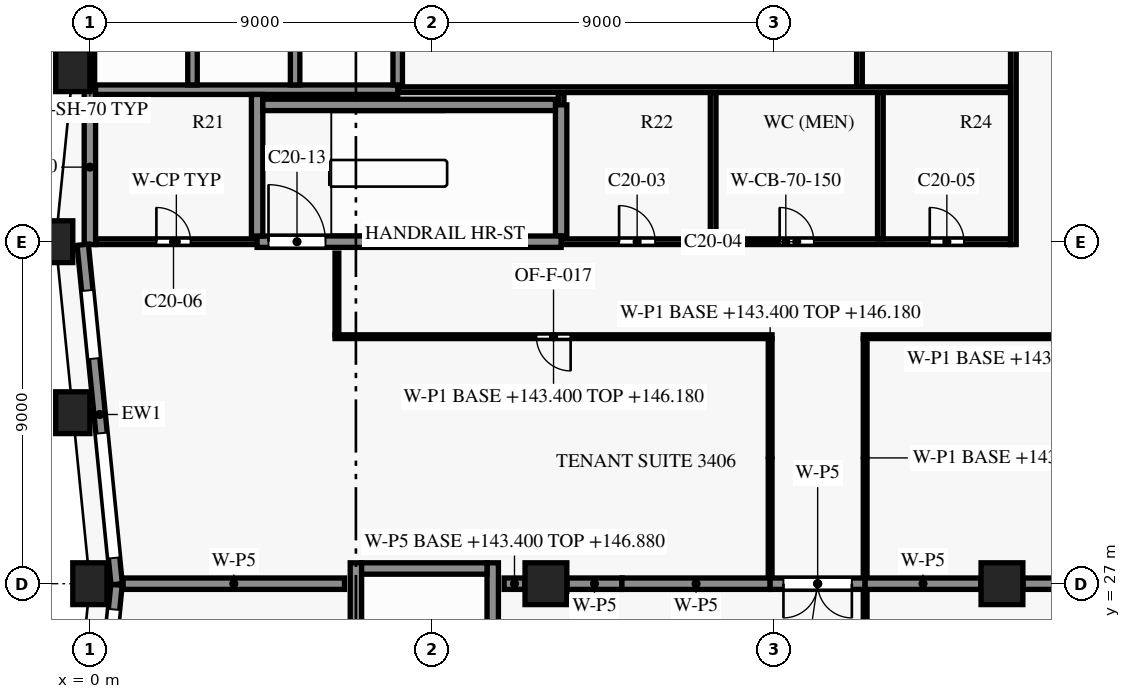
"""IFC4 building model, lengths in metres.
Left out: names, types, materials, properties, quantities, classifications, styles, units other than length and angle.
Written with IfcOpenShell. Run it as: python <this file> out.ifc"""

import sys

from ifc_helpers import new_model, si_unit, direction, frame, frame_2d, origin, origin_2d, place, context, subcontext, project, spatial, rectangle, extrude, element, fill, save


model = new_model("IFC4")
c1 = context("Model", 3, precision=1e-05, world=origin(), true_north=direction((0.0, 1.0)))
c2 = subcontext(c1, "Body", "Model", "MODEL_VIEW")
j1 = project(units=[si_unit("LENGTHUNIT", "METRE"), si_unit("PLANEANGLEUNIT", "RADIAN")], contexts=[c1])
p1 = place(None, origin())
s1 = spatial("IfcSite", under=j1, at=p1, CompositionType="ELEMENT")
p2 = place(p1, origin())
s2 = spatial("IfcBuilding", under=s1, at=p2, CompositionType="ELEMENT")
p3 = place(p2, frame((0.0, 0.0, 143.4)))
s3 = spatial("IfcBuildingStorey", under=s2, at=p3, CompositionType="ELEMENT", Elevation=143.4)
for number, where, z_axis, x_axis in (
    (1, (-0.45, 40.5, 0.0), (0.0, 0.0, 1.0), (-0.1, -0.995, 0.0)),
    (2, (-0.9, 36.0, 0.0), (0.0, 0.0, 1.0), (0.0, -1.0, 0.0)),
    (3, (-0.45, 31.5, 0.0), (0.0, 0.0, 1.0), (0.1, -0.995, 0.0)),
    (4, (0.0, 27.0, 0.0), (0.0, 0.0, 1.0), (0.0, -1.0, 0.0)),
):
    element("IfcColumn", number, at=place(p3, frame(where, z_axis=z_axis, x_axis=x_axis)), inside=s3, PredefinedType="COLUMN", context=c2, shape_type="SweptSolid", body=[
        extrude(rectangle(XDim=0.9, YDim=1.1, at=origin_2d()), origin(), (0.0, 0.0, 1.0), 3.8),
    ])
for number, where, z_axis, x_axis in (
    (5, (12.0, 27.0, 0.0), (0.0, 0.0, 1.0), (1.0, 0.0, 0.0)),
    (6, (24.0, 27.0, 0.0), (0.0, 0.0, 1.0), (1.0, 0.0, 0.0)),
):
    element("IfcColumn", number, at=place(p3, frame(where, z_axis=z_axis, x_axis=x_axis)), inside=s3, PredefinedType="COLUMN", context=c2, shape_type="SweptSolid", body=[
        extrude(rectangle(XDim=1.1, YDim=1.1, at=origin_2d()), origin(), (0.0, 0.0, 1.0), 3.8),
    ])
p4 = place(p3, frame((0.705, 26.985, 0.0), z_axis=(0.0, 0.0, 1.0), x_axis=(-0.099533329093, 0.995034228758, 0.0)))
e7 = element("IfcWall", 7, at=p4, inside=s3, PredefinedType="SOLIDWALL", context=c2, shape_type="SweptSolid", body=[
    extrude(rectangle(XDim=8.98, YDim=0.3, at=frame_2d((4.49, 0.0))), origin(), (0.0, 0.0, 1.0), 3.15),
])
p5 = place(p4, frame((0.696, 0.0, 0.15)))
e8 = element("IfcOpeningElement", 8, at=p5, cuts=e7, PredefinedType="OPENING", context=c2, shape_type="SweptSolid", body=[
    extrude(rectangle(XDim=3.3, YDim=2.4, at=frame_2d((1.65, 1.2))), frame((0.0, 0.16, 0.0), z_axis=(0.0, -1.0, 0.0), x_axis=(1.0, 0.0, 0.0)), (0.0, 0.0, 1.0), 0.32),
])
p6 = place(p4, frame((5.969, 0.0, 0.75)))
e9 = element("IfcOpeningElement", 9, at=p6, cuts=e7, PredefinedType="OPENING", context=c2, shape_type="SweptSolid", body=[
    extrude(rectangle(XDim=1.8, YDim=1.8, at=frame_2d((0.9, 0.9))), frame((0.0, 0.16, 0.0), z_axis=(0.0, -1.0, 0.0), x_axis=(1.0, 0.0, 0.0)), (0.0, 0.0, 1.0), 0.32),
])
p7 = place(p3, frame((-0.198, 17.985, 0.0), z_axis=(0.0, 0.0, 1.0), x_axis=(0.099495688264, 0.995037993253, 0.0)))
e10 = element("IfcWall", 10, at=p7, inside=s3, PredefinedType="SOLIDWALL", context=c2, shape_type="SweptSolid", body=[
    extrude(rectangle(XDim=9.03, YDim=0.3, at=frame_2d((4.515, 0.0))), origin(), (0.0, 0.0, 1.0), 3.15),
])
p8 = place(p7, frame((1.306, 0.0, 0.75)))
e11 = element("IfcOpeningElement", 11, at=p8, cuts=e10, PredefinedType="OPENING", context=c2, shape_type="SweptSolid", body=[
    extrude(rectangle(XDim=1.8, YDim=1.8, at=frame_2d((0.9, 0.9))), frame((0.0, 0.16, 0.0), z_axis=(0.0, -1.0, 0.0), x_axis=(1.0, 0.0, 0.0)), (0.0, 0.0, 1.0), 0.32),
])
p9 = place(p7, frame((5.079, 0.0, 0.15)))
e12 = element("IfcOpeningElement", 12, at=p9, cuts=e10, PredefinedType="OPENING", context=c2, shape_type="SweptSolid", body=[
    extrude(rectangle(XDim=3.3, YDim=2.4, at=frame_2d((1.65, 1.2))), frame((0.0, 0.16, 0.0), z_axis=(0.0, -1.0, 0.0), x_axis=(1.0, 0.0, 0.0)), (0.0, 0.0, 1.0), 0.32),
])
p10 = place(p3, frame((7.15, 27.4, 0.0), z_axis=(0.0, 0.0, 1.0), x_axis=(1.0, 0.0, 0.0)))
e13 = element("IfcWall", 13, at=p10, inside=s3, PredefinedType="SHEAR", context=c2, shape_type="SweptSolid", body=[
    extrude(rectangle(XDim=3.3, YDim=0.3, at=frame_2d((1.65, 0.0))), origin(), (0.0, 0.0, 1.0), 3.5),
])
p11 = place(p3, frame((0.15, 36.0, 0.0), z_axis=(0.0, 0.0, 1.0), x_axis=(1.0, 0.0, 0.0)))
e14 = element("IfcWall", 14, at=p11, inside=s3, PredefinedType="PARTITIONING", context=c2, shape_type="SweptSolid", body=[
    extrude(rectangle(XDim=4.25, YDim=0.15, at=frame_2d((2.125, 0.0))), origin(), (0.0, 0.0, 1.0), 3.5),
])
p12 = place(p11, frame((1.6, 0.0, 0.0)))
e15 = element("IfcOpeningElement", 15, at=p12, cuts=e14, PredefinedType="OPENING", context=c2, shape_type="SweptSolid", body=[
    extrude(rectangle(XDim=0.9, YDim=2.1, at=frame_2d((0.45, 1.05))), frame((0.0, 0.085, 0.0), z_axis=(0.0, -1.0, 0.0), x_axis=(1.0, 0.0, 0.0)), (0.0, 0.0, 1.0), 0.17),
])
p13 = place(p3, frame((12.4, 36.0, 0.0), z_axis=(0.0, 0.0, 1.0), x_axis=(1.0, 0.0, 0.0)))
e16 = element("IfcWall", 16, at=p13, inside=s3, PredefinedType="SHEAR", context=c2, shape_type="SweptSolid", body=[
    extrude(rectangle(XDim=11.825, YDim=0.15, at=frame_2d((5.913, 0.0))), origin(), (0.0, 0.0, 1.0), 3.5),
])
p14 = place(p13, frame((1.525, 0.0, 0.0)))
e17 = element("IfcOpeningElement", 17, at=p14, cuts=e16, PredefinedType="OPENING", context=c2, shape_type="SweptSolid", body=[
    extrude(rectangle(XDim=0.95, YDim=2.1, at=frame_2d((0.475, 1.05))), frame((0.0, 0.085, 0.0), z_axis=(0.0, -1.0, 0.0), x_axis=(1.0, 0.0, 0.0)), (0.0, 0.0, 1.0), 0.17),
])
p15 = place(p13, frame((5.75, 0.0, 0.0)))
e18 = element("IfcOpeningElement", 18, at=p15, cuts=e16, PredefinedType="OPENING", context=c2, shape_type="SweptSolid", body=[
    extrude(rectangle(XDim=0.9, YDim=2.1, at=frame_2d((0.45, 1.05))), frame((0.0, 0.085, 0.0), z_axis=(0.0, -1.0, 0.0), x_axis=(1.0, 0.0, 0.0)), (0.0, 0.0, 1.0), 0.17),
])
p16 = place(p13, frame((9.7, 0.0, 0.0)))
e19 = element("IfcOpeningElement", 19, at=p16, cuts=e16, PredefinedType="OPENING", context=c2, shape_type="SweptSolid", body=[
    extrude(rectangle(XDim=0.9, YDim=2.1, at=frame_2d((0.45, 1.05))), frame((0.0, 0.085, 0.0), z_axis=(0.0, -1.0, 0.0), x_axis=(1.0, 0.0, 0.0)), (0.0, 0.0, 1.0), 0.17),
])
p17 = place(p3, frame((4.4, 36.0, 0.0), z_axis=(0.0, 0.0, 1.0), x_axis=(1.0, 0.0, 0.0)))
e20 = element("IfcWall", 20, at=p17, inside=s3, PredefinedType="SHEAR", context=c2, shape_type="SweptSolid", body=[
    extrude(rectangle(XDim=8.0, YDim=0.3, at=frame_2d((4.0, 0.0))), origin(), (0.0, 0.0, 1.0), 3.5),
])
p18 = place(p17, frame((0.3, 0.0, 0.0)))
e21 = element("IfcOpeningElement", 21, at=p18, cuts=e20, PredefinedType="OPENING", context=c2, shape_type="SweptSolid", body=[
    extrude(rectangle(XDim=1.5, YDim=2.2, at=frame_2d((0.75, 1.1))), frame((0.0, 0.16, 0.0), z_axis=(0.0, -1.0, 0.0), x_axis=(1.0, 0.0, 0.0)), (0.0, 0.0, 1.0), 0.32),
])
p19 = place(p3, frame((4.55, 39.6, 0.0), z_axis=(0.0, 0.0, 1.0), x_axis=(1.0, 0.0, 0.0)))
e22 = element("IfcWall", 22, at=p19, inside=s3, PredefinedType="SHEAR", context=c2, shape_type="SweptSolid", body=[
    extrude(rectangle(XDim=7.7, YDim=0.3, at=frame_2d((3.85, 0.0))), origin(), (0.0, 0.0, 1.0), 3.5),
])
p20 = place(p3, frame((8.1, 40.0, 0.0), z_axis=(0.0, 0.0, 1.0), x_axis=(1.0, 0.0, 0.0)))
e23 = element("IfcWall", 23, at=p20, inside=s3, PredefinedType="PARTITIONING", context=c2, shape_type="SweptSolid", body=[
    extrude(rectangle(XDim=16.125, YDim=0.15, at=frame_2d((8.062, 0.0))), origin(), (0.0, 0.0, 1.0), 3.5),
])
p21 = place(p3, frame((0.15, 40.0, 0.0), z_axis=(0.0, 0.0, 1.0), x_axis=(1.0, 0.0, 0.0)))
e24 = element("IfcWall", 24, at=p21, inside=s3, PredefinedType="SHEAR", context=c2, shape_type="SweptSolid", body=[
    extrude(rectangle(XDim=7.95, YDim=0.25, at=frame_2d((3.975, 0.0))), origin(), (0.0, 0.0, 1.0), 3.5),
])
p22 = place(p3, frame((0.0, 35.925, 0.0), z_axis=(0.0, 0.0, 1.0), x_axis=(0.0, 1.0, 0.0)))
e25 = element("IfcWall", 25, at=p22, inside=s3, PredefinedType="SHEAR", context=c2, shape_type="SweptSolid", body=[
    extrude(rectangle(XDim=4.075, YDim=0.3, at=frame_2d((2.038, 0.0))), origin(), (0.0, 0.0, 1.0), 3.5),
])
p23 = place(p3, frame((0.0, 40.0, 0.0), z_axis=(0.0, 0.0, 1.0), x_axis=(0.0, 1.0, 0.0)))
e26 = element("IfcWall", 26, at=p23, inside=s3, PredefinedType="SHEAR", context=c2, shape_type="SweptSolid", body=[
    extrude(rectangle(XDim=3.325, YDim=0.25, at=frame_2d((1.663, 0.0))), origin(), (0.0, 0.0, 1.0), 3.5),
])
p24 = place(p3, frame((2.7, 40.125, 0.0), z_axis=(0.0, 0.0, 1.0), x_axis=(0.0, 1.0, 0.0)))
e27 = element("IfcWall", 27, at=p24, inside=s3, PredefinedType="SHEAR", context=c2, shape_type="SweptSolid", body=[
    extrude(rectangle(XDim=2.95, YDim=0.25, at=frame_2d((1.475, 0.0))), origin(), (0.0, 0.0, 1.0), 3.5),
])
p25 = place(p3, frame((4.4, 36.15, 0.0), z_axis=(0.0, 0.0, 1.0), x_axis=(0.0, 1.0, 0.0)))
e28 = element("IfcWall", 28, at=p25, inside=s3, PredefinedType="SHEAR", context=c2, shape_type="SweptSolid", body=[
    extrude(rectangle(XDim=3.725, YDim=0.3, at=frame_2d((1.863, 0.0))), origin(), (0.0, 0.0, 1.0), 3.5),
])
p26 = place(p3, frame((5.4, 40.125, 0.0), z_axis=(0.0, 0.0, 1.0), x_axis=(0.0, 1.0, 0.0)))
e29 = element("IfcWall", 29, at=p26, inside=s3, PredefinedType="SHEAR", context=c2, shape_type="SweptSolid", body=[
    extrude(rectangle(XDim=2.95, YDim=0.25, at=frame_2d((1.475, 0.0))), origin(), (0.0, 0.0, 1.0), 3.5),
])
p27 = place(p3, frame((7.0, 19.25, 0.0), z_axis=(0.0, 0.0, 1.0), x_axis=(0.0, 1.0, 0.0)))
e30 = element("IfcWall", 30, at=p27, inside=s3, PredefinedType="SHEAR", context=c2, shape_type="SweptSolid", body=[
    extrude(rectangle(XDim=8.3, YDim=0.3, at=frame_2d((4.15, 0.0))), origin(), (0.0, 0.0, 1.0), 3.5),
])
p28 = place(p3, frame((8.1, 40.125, 0.0), z_axis=(0.0, 0.0, 1.0), x_axis=(0.0, 1.0, 0.0)))
e31 = element("IfcWall", 31, at=p28, inside=s3, PredefinedType="SHEAR", context=c2, shape_type="SweptSolid", body=[
    extrude(rectangle(XDim=2.95, YDim=0.25, at=frame_2d((1.475, 0.0))), origin(), (0.0, 0.0, 1.0), 3.5),
])
p29 = place(p3, frame((10.6, 19.25, 0.0), z_axis=(0.0, 0.0, 1.0), x_axis=(0.0, 1.0, 0.0)))
e32 = element("IfcWall", 32, at=p29, inside=s3, PredefinedType="SHEAR", context=c2, shape_type="SweptSolid", body=[
    extrude(rectangle(XDim=8.3, YDim=0.3, at=frame_2d((4.15, 0.0))), origin(), (0.0, 0.0, 1.0), 3.5),
])
p30 = place(p29, frame((0.55, 0.0, 0.0)))
e33 = element("IfcOpeningElement", 33, at=p30, cuts=e32, PredefinedType="OPENING", context=c2, shape_type="SweptSolid", body=[
    extrude(rectangle(XDim=1.2, YDim=2.2, at=frame_2d((0.6, 1.1))), frame((0.0, 0.16, 0.0), z_axis=(0.0, -1.0, 0.0), x_axis=(1.0, 0.0, 0.0)), (0.0, 0.0, 1.0), 0.32),
])
p31 = place(p3, frame((12.4, 39.6, 0.0), z_axis=(0.0, 0.0, 1.0), x_axis=(0.0, 1.0, 0.0)))
e34 = element("IfcWall", 34, at=p31, inside=s3, PredefinedType="PARTITIONING", context=c2, shape_type="SweptSolid", body=[
    extrude(rectangle(XDim=0.325, YDim=0.15, at=frame_2d((0.163, 0.0))), origin(), (0.0, 0.0, 1.0), 3.5),
])
p32 = place(p3, frame((12.4, 36.15, 0.0), z_axis=(0.0, 0.0, 1.0), x_axis=(0.0, 1.0, 0.0)))
e35 = element("IfcWall", 35, at=p32, inside=s3, PredefinedType="SHEAR", context=c2, shape_type="SweptSolid", body=[
    extrude(rectangle(XDim=3.45, YDim=0.3, at=frame_2d((1.725, 0.0))), origin(), (0.0, 0.0, 1.0), 3.5),
])
p33 = place(p3, frame((16.4, 36.075, 0.0), z_axis=(0.0, 0.0, 1.0), x_axis=(0.0, 1.0, 0.0)))
e36 = element("IfcWall", 36, at=p33, inside=s3, PredefinedType="PARTITIONING", context=c2, shape_type="SweptSolid", body=[
    extrude(rectangle(XDim=3.85, YDim=0.15, at=frame_2d((1.925, 0.0))), origin(), (0.0, 0.0, 1.0), 3.5),
])
p34 = place(p3, frame((20.25, 40.075, 0.0), z_axis=(0.0, 0.0, 1.0), x_axis=(0.0, 1.0, 0.0)))
e37 = element("IfcWall", 37, at=p34, inside=s3, PredefinedType="PARTITIONING", context=c2, shape_type="SweptSolid", body=[
    extrude(rectangle(XDim=3.05, YDim=0.15, at=frame_2d((1.525, 0.0))), origin(), (0.0, 0.0, 1.0), 3.5),
])
p35 = place(p3, frame((20.8, 36.075, 0.0), z_axis=(0.0, 0.0, 1.0), x_axis=(0.0, 1.0, 0.0)))
e38 = element("IfcWall", 38, at=p35, inside=s3, PredefinedType="PARTITIONING", context=c2, shape_type="SweptSolid", body=[
    extrude(rectangle(XDim=3.85, YDim=0.15, at=frame_2d((1.925, 0.0))), origin(), (0.0, 0.0, 1.0), 3.5),
])
p36 = place(p3, frame((24.3, 35.925, 0.0), z_axis=(0.0, 0.0, 1.0), x_axis=(0.0, 1.0, 0.0)))
e39 = element("IfcWall", 39, at=p36, inside=s3, PredefinedType="PARTITIONING", context=c2, shape_type="SweptSolid", body=[
    extrude(rectangle(XDim=7.35, YDim=0.15, at=frame_2d((3.675, 0.0))), origin(), (0.0, 0.0, 1.0), 3.5),
])
p37 = place(p3, frame((20.4, 26.83, 0.0), z_axis=(0.0, 0.0, 1.0), x_axis=(0.0, -1.0, 0.0)))
e40 = element("IfcWall", 40, at=p37, inside=s3, PredefinedType="PARTITIONING", context=c2, shape_type="SweptSolid", body=[
    extrude(rectangle(XDim=8.78, YDim=0.1, at=frame_2d((4.39, 0.0))), origin(), (0.0, 0.0, 1.0), 2.78),
])
p38 = place(p37, frame((3.88, 0.0, 0.0)))
e41 = element("IfcOpeningElement", 41, at=p38, cuts=e40, PredefinedType="OPENING", context=c2, shape_type="SweptSolid", body=[
    extrude(rectangle(XDim=0.9, YDim=2.1, at=frame_2d((0.45, 1.05))), frame((0.0, 0.06, 0.0), z_axis=(0.0, -1.0, 0.0), x_axis=(1.0, 0.0, 0.0)), (0.0, 0.0, 1.0), 0.12),
])
p39 = place(p3, frame((0.874, 27.0, 0.0), z_axis=(0.0, 0.0, 1.0), x_axis=(1.0, 0.0, 0.0)))
e42 = element("IfcWall", 42, at=p39, inside=s3, PredefinedType="PARTITIONING", context=c2, shape_type="SweptSolid", body=[
    extrude(rectangle(XDim=5.826, YDim=0.3, at=frame_2d((2.913, 0.0))), origin(), (0.0, 0.0, 1.0), 2.78),
])
p40 = place(p3, frame((10.9, 27.0, 0.0), z_axis=(0.0, 0.0, 1.0), x_axis=(1.0, 0.0, 0.0)))
e43 = element("IfcWall", 43, at=p40, inside=s3, PredefinedType="PARTITIONING", context=c2, shape_type="SweptSolid", body=[
    extrude(rectangle(XDim=0.545, YDim=0.3, at=frame_2d((0.272, 0.0))), origin(), (0.0, 0.0, 1.0), 3.48),
])
p41 = place(p3, frame((12.555, 27.0, 0.0), z_axis=(0.0, 0.0, 1.0), x_axis=(1.0, 0.0, 0.0)))
e44 = element("IfcWall", 44, at=p41, inside=s3, PredefinedType="PARTITIONING", context=c2, shape_type="SweptSolid", body=[
    extrude(rectangle(XDim=1.445, YDim=0.3, at=frame_2d((0.723, 0.0))), origin(), (0.0, 0.0, 1.0), 2.78),
])
p42 = place(p3, frame((14.0, 27.0, 0.0), z_axis=(0.0, 0.0, 1.0), x_axis=(1.0, 0.0, 0.0)))
e45 = element("IfcWall", 45, at=p42, inside=s3, PredefinedType="PARTITIONING", context=c2, shape_type="SweptSolid", body=[
    extrude(rectangle(XDim=3.9, YDim=0.3, at=frame_2d((1.95, 0.0))), origin(), (0.0, 0.0, 1.0), 2.78),
])
p43 = place(p3, frame((20.4, 27.0, 0.0), z_axis=(0.0, 0.0, 1.0), x_axis=(-1.0, 0.0, 0.0)))
e46 = element("IfcWall", 46, at=p43, inside=s3, PredefinedType="PARTITIONING", context=c2, shape_type="SweptSolid", body=[
    extrude(rectangle(XDim=2.5, YDim=0.3, at=frame_2d((1.25, 0.0))), origin(), (0.0, 0.0, 1.0), 2.78),
])
p44 = place(p43, frame((0.35, 0.0, 0.0)))
e47 = element("IfcOpeningElement", 47, at=p44, cuts=e46, PredefinedType="OPENING", context=c2, shape_type="SweptSolid", body=[
    extrude(rectangle(XDim=1.8, YDim=2.1, at=frame_2d((0.9, 1.05))), frame((0.0, 0.16, 0.0), z_axis=(0.0, -1.0, 0.0), x_axis=(1.0, 0.0, 0.0)), (0.0, 0.0, 1.0), 0.32),
])
p45 = place(p3, frame((20.4, 27.0, 0.0), z_axis=(0.0, 0.0, 1.0), x_axis=(1.0, 0.0, 0.0)))
e48 = element("IfcWall", 48, at=p45, inside=s3, PredefinedType="PARTITIONING", context=c2, shape_type="SweptSolid", body=[
    extrude(rectangle(XDim=3.045, YDim=0.3, at=frame_2d((1.522, 0.0))), origin(), (0.0, 0.0, 1.0), 2.78),
])
p46 = place(p3, frame((24.555, 27.0, 0.0), z_axis=(0.0, 0.0, 1.0), x_axis=(1.0, 0.0, 0.0)))
e49 = element("IfcWall", 49, at=p46, inside=s3, PredefinedType="PARTITIONING", context=c2, shape_type="SweptSolid", body=[
    extrude(rectangle(XDim=10.571, YDim=0.3, at=frame_2d((5.285, 0.0))), origin(), (0.0, 0.0, 1.0), 2.78),
])
for number, where, z_axis, x_axis in (
    (50, (17.9, 27.17, 0.0), (0.0, 0.0, 1.0), (0.0, 1.0, 0.0)),
    (51, (20.4, 33.45, 0.0), (0.0, 0.0, 1.0), (0.0, -1.0, 0.0)),
):
    element("IfcWall", number, at=place(p3, frame(where, z_axis=z_axis, x_axis=x_axis)), inside=s3, PredefinedType="PARTITIONING", context=c2, shape_type="SweptSolid", body=[
        extrude(rectangle(XDim=6.28, YDim=0.1, at=frame_2d((3.14, 0.0))), origin(), (0.0, 0.0, 1.0), 2.78),
    ])
p47 = place(p3, frame((17.95, 33.5, 0.0), z_axis=(0.0, 0.0, 1.0), x_axis=(-1.0, 0.0, 0.0)))
e52 = element("IfcWall", 52, at=p47, inside=s3, PredefinedType="PARTITIONING", context=c2, shape_type="SweptSolid", body=[
    extrude(rectangle(XDim=11.5, YDim=0.1, at=frame_2d((5.75, 0.0))), origin(), (0.0, 0.0, 1.0), 2.78),
])
p48 = place(p47, frame((5.3, 0.0, 0.0)))
e53 = element("IfcOpeningElement", 53, at=p48, cuts=e52, PredefinedType="OPENING", context=c2, shape_type="SweptSolid", body=[
    extrude(rectangle(XDim=0.9, YDim=2.1, at=frame_2d((0.45, 1.05))), frame((0.0, 0.06, 0.0), z_axis=(0.0, -1.0, 0.0), x_axis=(1.0, 0.0, 0.0)), (0.0, 0.0, 1.0), 0.12),
])
p49 = place(p3, frame((30.55, 33.5, 0.0), z_axis=(0.0, 0.0, 1.0), x_axis=(-1.0, 0.0, 0.0)))
e54 = element("IfcWall", 54, at=p49, inside=s3, PredefinedType="PARTITIONING", context=c2, shape_type="SweptSolid", body=[
    extrude(rectangle(XDim=10.2, YDim=0.1, at=frame_2d((5.1, 0.0))), origin(), (0.0, 0.0, 1.0), 2.78),
])
p50 = place(p3, frame((6.5, 33.55, 0.0), z_axis=(0.0, 0.0, 1.0), x_axis=(0.0, 1.0, 0.0)))
e55 = element("IfcWall", 55, at=p50, inside=s3, PredefinedType="PARTITIONING", context=c2, shape_type="SweptSolid", body=[
    extrude(rectangle(XDim=2.15, YDim=0.1, at=frame_2d((1.075, 0.0))), origin(), (0.0, 0.0, 1.0), 3.48),
])
p51 = place(p5, origin())
e56 = element("IfcWindow", 56, at=p51, inside=s3, PartitioningType="SINGLE_PANEL", PredefinedType="WINDOW", context=c2, shape_type="SweptSolid", body=[
    extrude(rectangle(XDim=3.3, YDim=2.4, at=frame_2d((1.65, 1.2))), frame((0.0, 0.03, 0.0), z_axis=(0.0, -1.0, 0.0), x_axis=(1.0, 0.0, 0.0)), (0.0, 0.0, 1.0), 0.06),
])
fill(e8, e56)
p52 = place(p6, origin())
e57 = element("IfcWindow", 57, at=p52, inside=s3, PartitioningType="SINGLE_PANEL", PredefinedType="WINDOW", context=c2, shape_type="SweptSolid", body=[
    extrude(rectangle(XDim=1.8, YDim=1.8, at=frame_2d((0.9, 0.9))), frame((0.0, 0.03, 0.0), z_axis=(0.0, -1.0, 0.0), x_axis=(1.0, 0.0, 0.0)), (0.0, 0.0, 1.0), 0.06),
])
fill(e9, e57)
p53 = place(p9, origin())
e58 = element("IfcWindow", 58, at=p53, inside=s3, PartitioningType="SINGLE_PANEL", PredefinedType="WINDOW", context=c2, shape_type="SweptSolid", body=[
    extrude(rectangle(XDim=3.3, YDim=2.4, at=frame_2d((1.65, 1.2))), frame((0.0, 0.03, 0.0), z_axis=(0.0, -1.0, 0.0), x_axis=(1.0, 0.0, 0.0)), (0.0, 0.0, 1.0), 0.06),
])
fill(e12, e58)
p54 = place(p14, origin())
e59 = element("IfcDoor", 59, at=p54, inside=s3, OperationType="SINGLE_SWING_RIGHT", PredefinedType="DOOR", context=c2, shape_type="SweptSolid", body=[
    extrude(rectangle(XDim=0.95, YDim=2.1, at=frame_2d((0.475, 1.05))), frame((0.0, 0.025, 0.0), z_axis=(0.0, -1.0, 0.0), x_axis=(1.0, 0.0, 0.0)), (0.0, 0.0, 1.0), 0.05),
])
fill(e17, e59)
p55 = place(p15, origin())
e60 = element("IfcDoor", 60, at=p55, inside=s3, OperationType="SINGLE_SWING_LEFT", PredefinedType="DOOR", context=c2, shape_type="SweptSolid", body=[
    extrude(rectangle(XDim=0.9, YDim=2.1, at=frame_2d((0.45, 1.05))), frame((0.0, 0.025, 0.0), z_axis=(0.0, -1.0, 0.0), x_axis=(1.0, 0.0, 0.0)), (0.0, 0.0, 1.0), 0.05),
])
fill(e18, e60)
p56 = place(p16, origin())
e61 = element("IfcDoor", 61, at=p56, inside=s3, OperationType="SINGLE_SWING_RIGHT", PredefinedType="DOOR", context=c2, shape_type="SweptSolid", body=[
    extrude(rectangle(XDim=0.9, YDim=2.1, at=frame_2d((0.45, 1.05))), frame((0.0, 0.025, 0.0), z_axis=(0.0, -1.0, 0.0), x_axis=(1.0, 0.0, 0.0)), (0.0, 0.0, 1.0), 0.05),
])
fill(e19, e61)
p57 = place(p12, origin())
e62 = element("IfcDoor", 62, at=p57, inside=s3, OperationType="SINGLE_SWING_LEFT", PredefinedType="DOOR", context=c2, shape_type="SweptSolid", body=[
    extrude(rectangle(XDim=0.9, YDim=2.1, at=frame_2d((0.45, 1.05))), frame((0.0, 0.025, 0.0), z_axis=(0.0, -1.0, 0.0), x_axis=(1.0, 0.0, 0.0)), (0.0, 0.0, 1.0), 0.05),
])
fill(e15, e62)
p58 = place(p18, origin())
e63 = element("IfcDoor", 63, at=p58, inside=s3, OperationType="SINGLE_SWING_RIGHT", PredefinedType="DOOR", context=c2, shape_type="SweptSolid", body=[
    extrude(rectangle(XDim=1.5, YDim=2.2, at=frame_2d((0.75, 1.1))), frame((0.0, 0.025, 0.0), z_axis=(0.0, -1.0, 0.0), x_axis=(1.0, 0.0, 0.0)), (0.0, 0.0, 1.0), 0.05),
])
fill(e21, e63)
p59 = place(p48, origin())
e64 = element("IfcDoor", 64, at=p59, inside=s3, OperationType="SINGLE_SWING_LEFT", PredefinedType="DOOR", context=c2, shape_type="SweptSolid", body=[
    extrude(rectangle(XDim=0.9, YDim=2.1, at=frame_2d((0.45, 1.05))), frame((0.0, 0.025, 0.0), z_axis=(0.0, -1.0, 0.0), x_axis=(1.0, 0.0, 0.0)), (0.0, 0.0, 1.0), 0.05),
])
fill(e53, e64)
p60 = place(p44, origin())
e65 = element("IfcDoor", 65, at=p60, inside=s3, OperationType="DOUBLE_DOOR_SINGLE_SWING", PredefinedType="DOOR", context=c2, shape_type="SweptSolid", body=[
    extrude(rectangle(XDim=1.8, YDim=2.1, at=frame_2d((0.9, 1.05))), frame((0.0, 0.025, 0.0), z_axis=(0.0, -1.0, 0.0), x_axis=(1.0, 0.0, 0.0)), (0.0, 0.0, 1.0), 0.05),
])
fill(e47, e65)
save(model, sys.argv[1])
